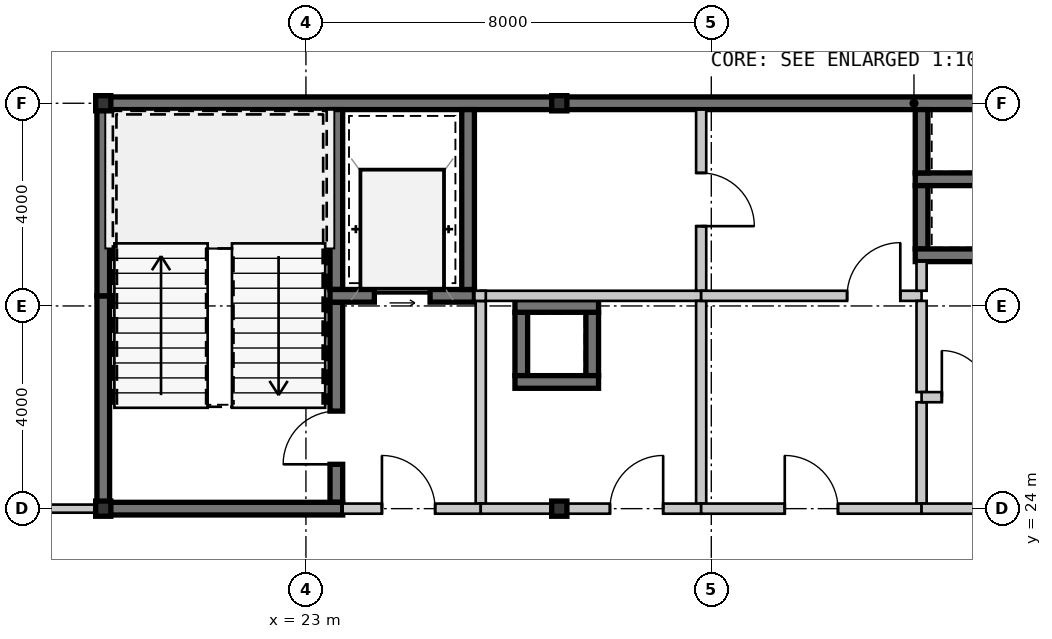
"""IFC4 building model, lengths in metres.
Left out: names, types, materials, properties, quantities, classifications, styles, units other than length and angle.
Written with IfcOpenShell. Run it as: python <this file> out.ifc"""

import sys

from ifc_helpers import new_model, si_unit, direction, frame, frame_2d, origin, origin_2d, place, context, subcontext, project, spatial, rectangle, hollow_rectangle, extrude, source, transform, mapped, element, fill, save


model = new_model("IFC4")
c1 = context("Model", 3, precision=1e-05, world=origin(), true_north=direction((0.0, 1.0)))
c2 = subcontext(c1, "Body", "Model", "MODEL_VIEW")
j1 = project(units=[si_unit("LENGTHUNIT", "METRE"), si_unit("PLANEANGLEUNIT", "RADIAN")], contexts=[c1])
p1 = place(None, origin())
s1 = spatial("IfcSite", under=j1, at=p1, CompositionType="ELEMENT")
p2 = place(p1, origin())
s2 = spatial("IfcBuilding", under=s1, at=p2, CompositionType="ELEMENT")
p3 = place(p2, frame((0.0, 0.0, 246.05)))
s3 = spatial("IfcBuildingStorey", under=s2, at=p3, CompositionType="ELEMENT", Elevation=246.05)
m1 = source(origin(), c2, "Body", "SweptSolid", [
    extrude(hollow_rectangle(XDim=0.3, YDim=0.3, WallThickness=0.012, at=origin_2d()), origin(), (0.0, 0.0, 1.0), 3.15),
])
for number, where, z_axis, x_axis in (
    (1, (19.0, 24.0, 0.0), (0.0, 0.0, 1.0), (1.0, 0.0, 0.0)),
    (2, (28.0, 24.0, 0.0), (0.0, 0.0, 1.0), (1.0, 0.0, 0.0)),
    (3, (19.0, 32.0, 0.0), (0.0, 0.0, 1.0), (1.0, 0.0, 0.0)),
    (4, (28.0, 32.0, 0.0), (0.0, 0.0, 1.0), (1.0, 0.0, 0.0)),
):
    element("IfcColumn", number, at=place(p3, frame(where, z_axis=z_axis, x_axis=x_axis)), inside=s3, PredefinedType="COLUMN", context=c2, shape_type="MappedRepresentation", body=[
        mapped(m1, transform((0.0, 0.0, 0.0), scale=1.0)),
    ])
m2 = source(origin(), c2, "Body", "SweptSolid", [
    extrude(rectangle(XDim=9.125, YDim=0.25, at=frame_2d((4.562, 0.0))), origin(), (0.0, 0.0, 1.0), 2.93),
])
p4 = place(p3, frame((18.875, 32.0, 0.0), z_axis=(0.0, 0.0, 1.0), x_axis=(1.0, 0.0, 0.0)))
e5 = element("IfcWall", 5, at=p4, inside=s3, PredefinedType="SHEAR", context=c2, shape_type="MappedRepresentation", body=[
    mapped(m2, transform((0.0, 0.0, 0.0), scale=1.0)),
])
m3 = source(origin(), c2, "Body", "SweptSolid", [
    extrude(rectangle(XDim=11.2, YDim=0.25, at=frame_2d((5.6, 0.0))), origin(), (0.0, 0.0, 1.0), 2.93),
])
p5 = place(p3, frame((28.0, 32.0, 0.0), z_axis=(0.0, 0.0, 1.0), x_axis=(1.0, 0.0, 0.0)))
e6 = element("IfcWall", 6, at=p5, inside=s3, PredefinedType="SHEAR", context=c2, shape_type="MappedRepresentation", body=[
    mapped(m3, transform((0.0, 0.0, 0.0), scale=1.0)),
])
m4 = source(origin(), c2, "Body", "SweptSolid", [
    extrude(rectangle(XDim=4.075, YDim=0.25, at=frame_2d((2.038, 0.0))), origin(), (0.0, 0.0, 1.0), 2.93),
])
p6 = place(p3, frame((19.0, 24.125, 0.0), z_axis=(0.0, 0.0, 1.0), x_axis=(0.0, 1.0, 0.0)))
e7 = element("IfcWall", 7, at=p6, inside=s3, PredefinedType="SHEAR", context=c2, shape_type="MappedRepresentation", body=[
    mapped(m4, transform((0.0, 0.0, 0.0), scale=1.0)),
])
m5 = source(origin(), c2, "Body", "SweptSolid", [
    extrude(rectangle(XDim=3.675, YDim=0.25, at=frame_2d((1.837, 0.0))), origin(), (0.0, 0.0, 1.0), 2.93),
])
p7 = place(p3, frame((19.0, 28.2, 0.0), z_axis=(0.0, 0.0, 1.0), x_axis=(0.0, 1.0, 0.0)))
e8 = element("IfcWall", 8, at=p7, inside=s3, PredefinedType="SHEAR", context=c2, shape_type="MappedRepresentation", body=[
    mapped(m5, transform((0.0, 0.0, 0.0), scale=1.0)),
])
m6 = source(origin(), c2, "Body", "SweptSolid", [
    extrude(rectangle(XDim=3.55, YDim=0.25, at=frame_2d((1.775, 0.0))), origin(), (0.0, 0.0, 1.0), 2.93),
])
p8 = place(p3, frame((23.6, 28.325, 0.0), z_axis=(0.0, 0.0, 1.0), x_axis=(0.0, 1.0, 0.0)))
e9 = element("IfcWall", 9, at=p8, inside=s3, PredefinedType="SHEAR", context=c2, shape_type="MappedRepresentation", body=[
    mapped(m6, transform((0.0, 0.0, 0.0), scale=1.0)),
])
m7 = source(origin(), c2, "Body", "SweptSolid", [
    extrude(rectangle(XDim=3.95, YDim=0.25, at=frame_2d((1.975, 0.0))), origin(), (0.0, 0.0, 1.0), 2.93),
])
p9 = place(p3, frame((23.6, 24.125, 0.0), z_axis=(0.0, 0.0, 1.0), x_axis=(0.0, 1.0, 0.0)))
e10 = element("IfcWall", 10, at=p9, inside=s3, PredefinedType="SHEAR", context=c2, shape_type="MappedRepresentation", body=[
    mapped(m7, transform((0.0, 0.0, 0.0), scale=1.0)),
])
m8 = source(origin(), c2, "Body", "SweptSolid", [
    extrude(rectangle(XDim=1.05, YDim=2.1, at=frame_2d((0.525, 1.05))), frame((0.0, 0.135, 0.0), z_axis=(0.0, -1.0, 0.0), x_axis=(1.0, 0.0, 0.0)), (0.0, 0.0, 1.0), 0.27),
])
p10 = place(p9, frame((0.75, 0.0, 0.0)))
e11 = element("IfcOpeningElement", 11, at=p10, cuts=e10, PredefinedType="OPENING", context=c2, shape_type="MappedRepresentation", body=[
    mapped(m8, transform((0.0, 0.0, 0.0), scale=1.0)),
])
m9 = source(origin(), c2, "Body", "SweptSolid", [
    extrude(rectangle(XDim=4.85, YDim=0.25, at=frame_2d((2.425, 0.0))), origin(), (0.0, 0.0, 1.0), 2.93),
])
p11 = place(p3, frame((18.875, 24.0, 0.0), z_axis=(0.0, 0.0, 1.0), x_axis=(1.0, 0.0, 0.0)))
e12 = element("IfcWall", 12, at=p11, inside=s3, PredefinedType="SHEAR", context=c2, shape_type="MappedRepresentation", body=[
    mapped(m9, transform((0.0, 0.0, 0.0), scale=1.0)),
])
m10 = source(origin(), c2, "Body", "SweptSolid", [
    extrude(rectangle(XDim=2.85, YDim=0.25, at=frame_2d((1.425, 0.0))), origin(), (0.0, 0.0, 1.0), 2.93),
])
p12 = place(p3, frame((23.475, 28.2, 0.0), z_axis=(0.0, 0.0, 1.0), x_axis=(1.0, 0.0, 0.0)))
e13 = element("IfcWall", 13, at=p12, inside=s3, PredefinedType="SHEAR", context=c2, shape_type="MappedRepresentation", body=[
    mapped(m10, transform((0.0, 0.0, 0.0), scale=1.0)),
])
m11 = source(origin(), c2, "Body", "SweptSolid", [
    extrude(rectangle(XDim=1.1, YDim=2.15, at=frame_2d((0.55, 1.075))), frame((0.0, 0.135, 0.0), z_axis=(0.0, -1.0, 0.0), x_axis=(1.0, 0.0, 0.0)), (0.0, 0.0, 1.0), 0.27),
])
p13 = place(p12, frame((0.875, 0.0, 0.0)))
e14 = element("IfcOpeningElement", 14, at=p13, cuts=e13, PredefinedType="OPENING", context=c2, shape_type="MappedRepresentation", body=[
    mapped(m11, transform((0.0, 0.0, 0.0), scale=1.0)),
])
p14 = place(p3, frame((26.2, 28.325, 0.0), z_axis=(0.0, 0.0, 1.0), x_axis=(0.0, 1.0, 0.0)))
e15 = element("IfcWall", 15, at=p14, inside=s3, PredefinedType="SHEAR", context=c2, shape_type="MappedRepresentation", body=[
    mapped(m6, transform((0.0, 0.0, 0.0), scale=1.0)),
])
m12 = source(origin(), c2, "Body", "SweptSolid", [
    extrude(rectangle(XDim=4.0, YDim=0.2, at=frame_2d((2.0, 0.0))), origin(), (0.0, 0.0, 1.0), 2.93),
])
p15 = place(p3, frame((26.45, 24.1, 0.0), z_axis=(0.0, 0.0, 1.0), x_axis=(0.0, 1.0, 0.0)))
e16 = element("IfcWall", 16, at=p15, inside=s3, PredefinedType="SOLIDWALL", context=c2, shape_type="MappedRepresentation", body=[
    mapped(m12, transform((0.0, 0.0, 0.0), scale=1.0)),
])
m13 = source(origin(), c2, "Body", "SweptSolid", [
    extrude(rectangle(XDim=2.725, YDim=0.2, at=frame_2d((1.362, 0.0))), origin(), (0.0, 0.0, 1.0), 2.47),
])
p16 = place(p3, frame((23.725, 24.0, 0.0), z_axis=(0.0, 0.0, 1.0), x_axis=(1.0, 0.0, 0.0)))
e17 = element("IfcWall", 17, at=p16, inside=s3, PredefinedType="SOLIDWALL", context=c2, shape_type="MappedRepresentation", body=[
    mapped(m13, transform((0.0, 0.0, 0.0), scale=1.0)),
])
m14 = source(origin(), c2, "Body", "SweptSolid", [
    extrude(rectangle(XDim=1.05, YDim=2.1, at=frame_2d((0.525, 1.05))), frame((0.0, 0.11, 0.0), z_axis=(0.0, -1.0, 0.0), x_axis=(1.0, 0.0, 0.0)), (0.0, 0.0, 1.0), 0.22),
])
p17 = place(p16, frame((0.775, 0.0, 0.0)))
e18 = element("IfcOpeningElement", 18, at=p17, cuts=e17, PredefinedType="OPENING", context=c2, shape_type="MappedRepresentation", body=[
    mapped(m14, transform((0.0, 0.0, 0.0), scale=1.0)),
])
m15 = source(origin(), c2, "Body", "SweptSolid", [
    extrude(rectangle(XDim=1.95, YDim=0.25, at=frame_2d((0.975, 0.0))), origin(), (0.0, 0.0, 1.0), 2.93),
])
p18 = place(p3, frame((35.025, 30.5, 0.0), z_axis=(0.0, 0.0, 1.0), x_axis=(1.0, 0.0, 0.0)))
e19 = element("IfcWall", 19, at=p18, inside=s3, PredefinedType="SHEAR", context=c2, shape_type="MappedRepresentation", body=[
    mapped(m15, transform((0.0, 0.0, 0.0), scale=1.0)),
])
m16 = source(origin(), c2, "Body", "SweptSolid", [
    extrude(rectangle(XDim=1.25, YDim=0.25, at=frame_2d((0.625, 0.0))), origin(), (0.0, 0.0, 1.0), 2.93),
])
for number, where, z_axis, x_axis in (
    (20, (35.15, 31.875, 0.0), (0.0, 0.0, 1.0), (0.0, -1.0, 0.0)),
    (21, (35.15, 30.375, 0.0), (0.0, 0.0, 1.0), (0.0, -1.0, 0.0)),
):
    element("IfcWall", number, at=place(p3, frame(where, z_axis=z_axis, x_axis=x_axis)), inside=s3, PredefinedType="SHEAR", context=c2, shape_type="MappedRepresentation", body=[
        mapped(m16, transform((0.0, 0.0, 0.0), scale=1.0)),
    ])
p19 = place(p3, frame((35.025, 29.0, 0.0), z_axis=(0.0, 0.0, 1.0), x_axis=(1.0, 0.0, 0.0)))
e22 = element("IfcWall", 22, at=p19, inside=s3, PredefinedType="SHEAR", context=c2, shape_type="MappedRepresentation", body=[
    mapped(m15, transform((0.0, 0.0, 0.0), scale=1.0)),
])
for number, where, z_axis, x_axis in (
    (23, (28.65, 26.625, 0.0), (0.0, 0.0, 1.0), (0.0, 1.0, 0.0)),
    (24, (27.25, 27.875, 0.0), (0.0, 0.0, 1.0), (0.0, -1.0, 0.0)),
):
    element("IfcWall", number, at=place(p3, frame(where, z_axis=z_axis, x_axis=x_axis)), inside=s3, PredefinedType="SHEAR", context=c2, shape_type="MappedRepresentation", body=[
        mapped(m16, transform((0.0, 0.0, 0.0), scale=1.0)),
    ])
m17 = source(origin(), c2, "Body", "SweptSolid", [
    extrude(rectangle(XDim=1.65, YDim=0.25, at=frame_2d((0.825, 0.0))), origin(), (0.0, 0.0, 1.0), 2.93),
])
for number, where, z_axis, x_axis in (
    (25, (28.775, 28.0, 0.0), (0.0, 0.0, 1.0), (-1.0, 0.0, 0.0)),
    (26, (27.125, 26.5, 0.0), (0.0, 0.0, 1.0), (1.0, 0.0, 0.0)),
):
    element("IfcWall", number, at=place(p3, frame(where, z_axis=z_axis, x_axis=x_axis)), inside=s3, PredefinedType="SHEAR", context=c2, shape_type="MappedRepresentation", body=[
        mapped(m17, transform((0.0, 0.0, 0.0), scale=1.0)),
    ])
m18 = source(origin(), c2, "Body", "SweptSolid", [
    extrude(rectangle(XDim=4.35, YDim=0.2, at=frame_2d((2.175, 0.0))), origin(), (0.0, 0.0, 1.0), 2.93),
])
p20 = place(p3, frame((26.45, 28.2, 0.0), z_axis=(0.0, 0.0, 1.0), x_axis=(1.0, 0.0, 0.0)))
e27 = element("IfcWall", 27, at=p20, inside=s3, PredefinedType="SOLIDWALL", context=c2, shape_type="MappedRepresentation", body=[
    mapped(m18, transform((0.0, 0.0, 0.0), scale=1.0)),
])
p21 = place(p3, frame((30.8, 28.1, 0.0), z_axis=(0.0, 0.0, 1.0), x_axis=(0.0, -1.0, 0.0)))
e28 = element("IfcWall", 28, at=p21, inside=s3, PredefinedType="SOLIDWALL", context=c2, shape_type="MappedRepresentation", body=[
    mapped(m12, transform((0.0, 0.0, 0.0), scale=1.0)),
])
m19 = source(origin(), c2, "Body", "SweptSolid", [
    extrude(rectangle(XDim=4.35, YDim=0.2, at=frame_2d((2.175, 0.0))), origin(), (0.0, 0.0, 1.0), 2.47),
])
p22 = place(p3, frame((30.8, 24.0, 0.0), z_axis=(0.0, 0.0, 1.0), x_axis=(-1.0, 0.0, 0.0)))
e29 = element("IfcWall", 29, at=p22, inside=s3, PredefinedType="SOLIDWALL", context=c2, shape_type="MappedRepresentation", body=[
    mapped(m19, transform((0.0, 0.0, 0.0), scale=1.0)),
])
p23 = place(p22, frame((0.75, 0.0, 0.0)))
e30 = element("IfcOpeningElement", 30, at=p23, cuts=e29, PredefinedType="OPENING", context=c2, shape_type="MappedRepresentation", body=[
    mapped(m14, transform((0.0, 0.0, 0.0), scale=1.0)),
])
m20 = source(origin(), c2, "Body", "SweptSolid", [
    extrude(rectangle(XDim=3.575, YDim=0.2, at=frame_2d((1.788, 0.0))), origin(), (0.0, 0.0, 1.0), 2.93),
])
p24 = place(p3, frame((30.8, 31.875, 0.0), z_axis=(0.0, 0.0, 1.0), x_axis=(0.0, -1.0, 0.0)))
e31 = element("IfcWall", 31, at=p24, inside=s3, PredefinedType="SOLIDWALL", context=c2, shape_type="MappedRepresentation", body=[
    mapped(m20, transform((0.0, 0.0, 0.0), scale=1.0)),
])
p25 = place(p24, frame((1.25, 0.0, 0.0)))
e32 = element("IfcOpeningElement", 32, at=p25, cuts=e31, PredefinedType="OPENING", context=c2, shape_type="MappedRepresentation", body=[
    mapped(m14, transform((0.0, 0.0, 0.0), scale=1.0)),
])
m21 = source(origin(), c2, "Body", "SweptSolid", [
    extrude(rectangle(XDim=4.35, YDim=0.2, at=frame_2d((2.175, 0.0))), origin(), (0.0, 0.0, 1.0), 2.93),
])
p26 = place(p3, frame((30.8, 28.2, 0.0), z_axis=(0.0, 0.0, 1.0), x_axis=(1.0, 0.0, 0.0)))
e33 = element("IfcWall", 33, at=p26, inside=s3, PredefinedType="SOLIDWALL", context=c2, shape_type="MappedRepresentation", body=[
    mapped(m21, transform((0.0, 0.0, 0.0), scale=1.0)),
])
p27 = place(p26, frame((2.88, 0.0, 0.0)))
e34 = element("IfcOpeningElement", 34, at=p27, cuts=e33, PredefinedType="OPENING", context=c2, shape_type="MappedRepresentation", body=[
    mapped(m14, transform((0.0, 0.0, 0.0), scale=1.0)),
])
m22 = source(origin(), c2, "Body", "SweptSolid", [
    extrude(rectangle(XDim=2.0, YDim=0.2, at=frame_2d((1.0, 0.0))), origin(), (0.0, 0.0, 1.0), 2.93),
])
p28 = place(p3, frame((35.15, 26.1, 0.0), z_axis=(0.0, 0.0, 1.0), x_axis=(0.0, -1.0, 0.0)))
e35 = element("IfcWall", 35, at=p28, inside=s3, PredefinedType="SOLIDWALL", context=c2, shape_type="MappedRepresentation", body=[
    mapped(m22, transform((0.0, 0.0, 0.0), scale=1.0)),
])
m23 = source(origin(), c2, "Body", "SweptSolid", [
    extrude(rectangle(XDim=1.8, YDim=0.2, at=frame_2d((0.9, 0.0))), origin(), (0.0, 0.0, 1.0), 2.93),
])
p29 = place(p3, frame((35.15, 28.1, 0.0), z_axis=(0.0, 0.0, 1.0), x_axis=(0.0, -1.0, 0.0)))
e36 = element("IfcWall", 36, at=p29, inside=s3, PredefinedType="SOLIDWALL", context=c2, shape_type="MappedRepresentation", body=[
    mapped(m23, transform((0.0, 0.0, 0.0), scale=1.0)),
])
m24 = source(origin(), c2, "Body", "SweptSolid", [
    extrude(rectangle(XDim=4.35, YDim=0.2, at=frame_2d((2.175, 0.0))), origin(), (0.0, 0.0, 1.0), 2.47),
])
p30 = place(p3, frame((35.15, 24.0, 0.0), z_axis=(0.0, 0.0, 1.0), x_axis=(-1.0, 0.0, 0.0)))
e37 = element("IfcWall", 37, at=p30, inside=s3, PredefinedType="SOLIDWALL", context=c2, shape_type="MappedRepresentation", body=[
    mapped(m24, transform((0.0, 0.0, 0.0), scale=1.0)),
])
p31 = place(p30, frame((1.65, 0.0, 0.0)))
e38 = element("IfcOpeningElement", 38, at=p31, cuts=e37, PredefinedType="OPENING", context=c2, shape_type="MappedRepresentation", body=[
    mapped(m14, transform((0.0, 0.0, 0.0), scale=1.0)),
])
m25 = source(origin(), c2, "Body", "SweptSolid", [
    extrude(rectangle(XDim=0.575, YDim=0.2, at=frame_2d((0.288, 0.0))), origin(), (0.0, 0.0, 1.0), 2.93),
])
p32 = place(p3, frame((35.15, 28.875, 0.0), z_axis=(0.0, 0.0, 1.0), x_axis=(0.0, -1.0, 0.0)))
e39 = element("IfcWall", 39, at=p32, inside=s3, PredefinedType="SOLIDWALL", context=c2, shape_type="MappedRepresentation", body=[
    mapped(m25, transform((0.0, 0.0, 0.0), scale=1.0)),
])
m26 = source(origin(), c2, "Body", "SweptSolid", [
    extrude(rectangle(XDim=1.72, YDim=0.2, at=frame_2d((0.86, 0.0))), origin(), (0.0, 0.0, 1.0), 2.93),
])
p33 = place(p3, frame((35.15, 26.2, 0.0), z_axis=(0.0, 0.0, 1.0), x_axis=(1.0, 0.0, 0.0)))
e40 = element("IfcWall", 40, at=p33, inside=s3, PredefinedType="SOLIDWALL", context=c2, shape_type="MappedRepresentation", body=[
    mapped(m26, transform((0.0, 0.0, 0.0), scale=1.0)),
])
m27 = source(origin(), c2, "Body", "SweptSolid", [
    extrude(rectangle(XDim=0.92, YDim=2.1, at=frame_2d((0.46, 1.05))), frame((0.0, 0.11, 0.0), z_axis=(0.0, -1.0, 0.0), x_axis=(1.0, 0.0, 0.0)), (0.0, 0.0, 1.0), 0.22),
])
p34 = place(p33, frame((0.4, 0.0, 0.0)))
e41 = element("IfcOpeningElement", 41, at=p34, cuts=e40, PredefinedType="OPENING", context=c2, shape_type="MappedRepresentation", body=[
    mapped(m27, transform((0.0, 0.0, 0.0), scale=1.0)),
])
m28 = source(origin(), c2, "Body", "SweptSolid", [
    extrude(rectangle(XDim=4.05, YDim=0.2, at=frame_2d((2.025, 0.0))), origin(), (0.0, 0.0, 1.0), 2.47),
])
p35 = place(p3, frame((39.2, 24.0, 0.0), z_axis=(0.0, 0.0, 1.0), x_axis=(-1.0, 0.0, 0.0)))
e42 = element("IfcWall", 42, at=p35, inside=s3, PredefinedType="SOLIDWALL", context=c2, shape_type="MappedRepresentation", body=[
    mapped(m28, transform((0.0, 0.0, 0.0), scale=1.0)),
])
p36 = place(p35, frame((1.5, 0.0, 0.0)))
e43 = element("IfcOpeningElement", 43, at=p36, cuts=e42, PredefinedType="OPENING", context=c2, shape_type="MappedRepresentation", body=[
    mapped(m14, transform((0.0, 0.0, 0.0), scale=1.0)),
])
m29 = source(origin(), c2, "Body", "SweptSolid", [
    extrude(rectangle(XDim=6.032, YDim=0.16, at=frame_2d((3.016, 0.0))), origin(), (0.0, 0.0, 1.0), 2.93),
])
p37 = place(p3, frame((12.843, 24.0, 0.0), z_axis=(0.0, 0.0, 1.0), x_axis=(1.0, 0.0, 0.0)))
e44 = element("IfcWall", 44, at=p37, inside=s3, PredefinedType="PARTITIONING", context=c2, shape_type="MappedRepresentation", body=[
    mapped(m29, transform((0.0, 0.0, 0.0), scale=1.0)),
])
m30 = source(origin(), c2, "Body", "SweptSolid", [
    extrude(rectangle(XDim=0.92, YDim=2.1, at=frame_2d((0.46, 1.05))), frame((0.0, 0.09, 0.0), z_axis=(0.0, -1.0, 0.0), x_axis=(1.0, 0.0, 0.0)), (0.0, 0.0, 1.0), 0.18),
])
p38 = place(p37, frame((2.608, 0.0, 0.0)))
e45 = element("IfcOpeningElement", 45, at=p38, cuts=e44, PredefinedType="OPENING", context=c2, shape_type="MappedRepresentation", body=[
    mapped(m30, transform((0.0, 0.0, 0.0), scale=1.0)),
])
m31 = source(origin(), c2, "Body", "SweptSolid", [
    extrude(rectangle(XDim=0.225, YDim=0.2, at=frame_2d((0.113, 0.0))), origin(), (0.0, 0.0, 1.0), 2.93),
])
p39 = place(p3, frame((26.325, 28.2, 0.0), z_axis=(0.0, 0.0, 1.0), x_axis=(1.0, 0.0, 0.0)))
e46 = element("IfcWall", 46, at=p39, inside=s3, PredefinedType="SOLIDWALL", context=c2, shape_type="MappedRepresentation", body=[
    mapped(m31, transform((0.0, 0.0, 0.0), scale=1.0)),
])
m32 = source(origin(), c2, "Body", "SweptSolid", [
    extrude(rectangle(XDim=1.05, YDim=2.1, at=frame_2d((0.525, 1.05))), frame((0.0, 0.025, 0.0), z_axis=(0.0, -1.0, 0.0), x_axis=(1.0, 0.0, 0.0)), (0.0, 0.0, 1.0), 0.05),
])
p40 = place(p10, origin())
e47 = element("IfcDoor", 47, at=p40, inside=s3, OperationType="SINGLE_SWING_LEFT", PredefinedType="DOOR", context=c2, shape_type="MappedRepresentation", body=[
    mapped(m32, transform((0.0, 0.0, 0.0), scale=1.0)),
])
fill(e11, e47)
m33 = source(origin(), c2, "Body", "SweptSolid", [
    extrude(rectangle(XDim=1.1, YDim=2.15, at=frame_2d((0.55, 1.075))), frame((0.0, 0.025, 0.0), z_axis=(0.0, -1.0, 0.0), x_axis=(1.0, 0.0, 0.0)), (0.0, 0.0, 1.0), 0.05),
])
p41 = place(p13, origin())
e48 = element("IfcDoor", 48, at=p41, inside=s3, OperationType="SLIDING_TO_LEFT", PredefinedType="DOOR", context=c2, shape_type="MappedRepresentation", body=[
    mapped(m33, transform((0.0, 0.0, 0.0), scale=1.0)),
])
fill(e14, e48)
p42 = place(p17, origin())
e49 = element("IfcDoor", 49, at=p42, inside=s3, OperationType="SINGLE_SWING_LEFT", PredefinedType="DOOR", context=c2, shape_type="MappedRepresentation", body=[
    mapped(m32, transform((0.0, 0.0, 0.0), scale=1.0)),
])
fill(e18, e49)
p43 = place(p23, frame((1.05, 0.0, 0.0), z_axis=(0.0, 0.0, 1.0), x_axis=(-1.0, 0.0, 0.0)))
e50 = element("IfcDoor", 50, at=p43, inside=s3, OperationType="SINGLE_SWING_RIGHT", PredefinedType="DOOR", context=c2, shape_type="MappedRepresentation", body=[
    mapped(m32, transform((0.0, 0.0, 0.0), scale=1.0)),
])
fill(e30, e50)
p44 = place(p25, origin())
e51 = element("IfcDoor", 51, at=p44, inside=s3, OperationType="SINGLE_SWING_RIGHT", PredefinedType="DOOR", context=c2, shape_type="MappedRepresentation", body=[
    mapped(m32, transform((0.0, 0.0, 0.0), scale=1.0)),
])
fill(e32, e51)
p45 = place(p27, origin())
e52 = element("IfcDoor", 52, at=p45, inside=s3, OperationType="SINGLE_SWING_RIGHT", PredefinedType="DOOR", context=c2, shape_type="MappedRepresentation", body=[
    mapped(m32, transform((0.0, 0.0, 0.0), scale=1.0)),
])
fill(e34, e52)
p46 = place(p31, frame((1.05, 0.0, 0.0), z_axis=(0.0, 0.0, 1.0), x_axis=(-1.0, 0.0, 0.0)))
e53 = element("IfcDoor", 53, at=p46, inside=s3, OperationType="SINGLE_SWING_LEFT", PredefinedType="DOOR", context=c2, shape_type="MappedRepresentation", body=[
    mapped(m32, transform((0.0, 0.0, 0.0), scale=1.0)),
])
fill(e38, e53)
m34 = source(origin(), c2, "Body", "SweptSolid", [
    extrude(rectangle(XDim=0.92, YDim=2.1, at=frame_2d((0.46, 1.05))), frame((0.0, 0.025, 0.0), z_axis=(0.0, -1.0, 0.0), x_axis=(1.0, 0.0, 0.0)), (0.0, 0.0, 1.0), 0.05),
])
p47 = place(p34, origin())
e54 = element("IfcDoor", 54, at=p47, inside=s3, OperationType="SINGLE_SWING_LEFT", PredefinedType="DOOR", context=c2, shape_type="MappedRepresentation", body=[
    mapped(m34, transform((0.0, 0.0, 0.0), scale=1.0)),
])
fill(e41, e54)
save(model, sys.argv[1])
